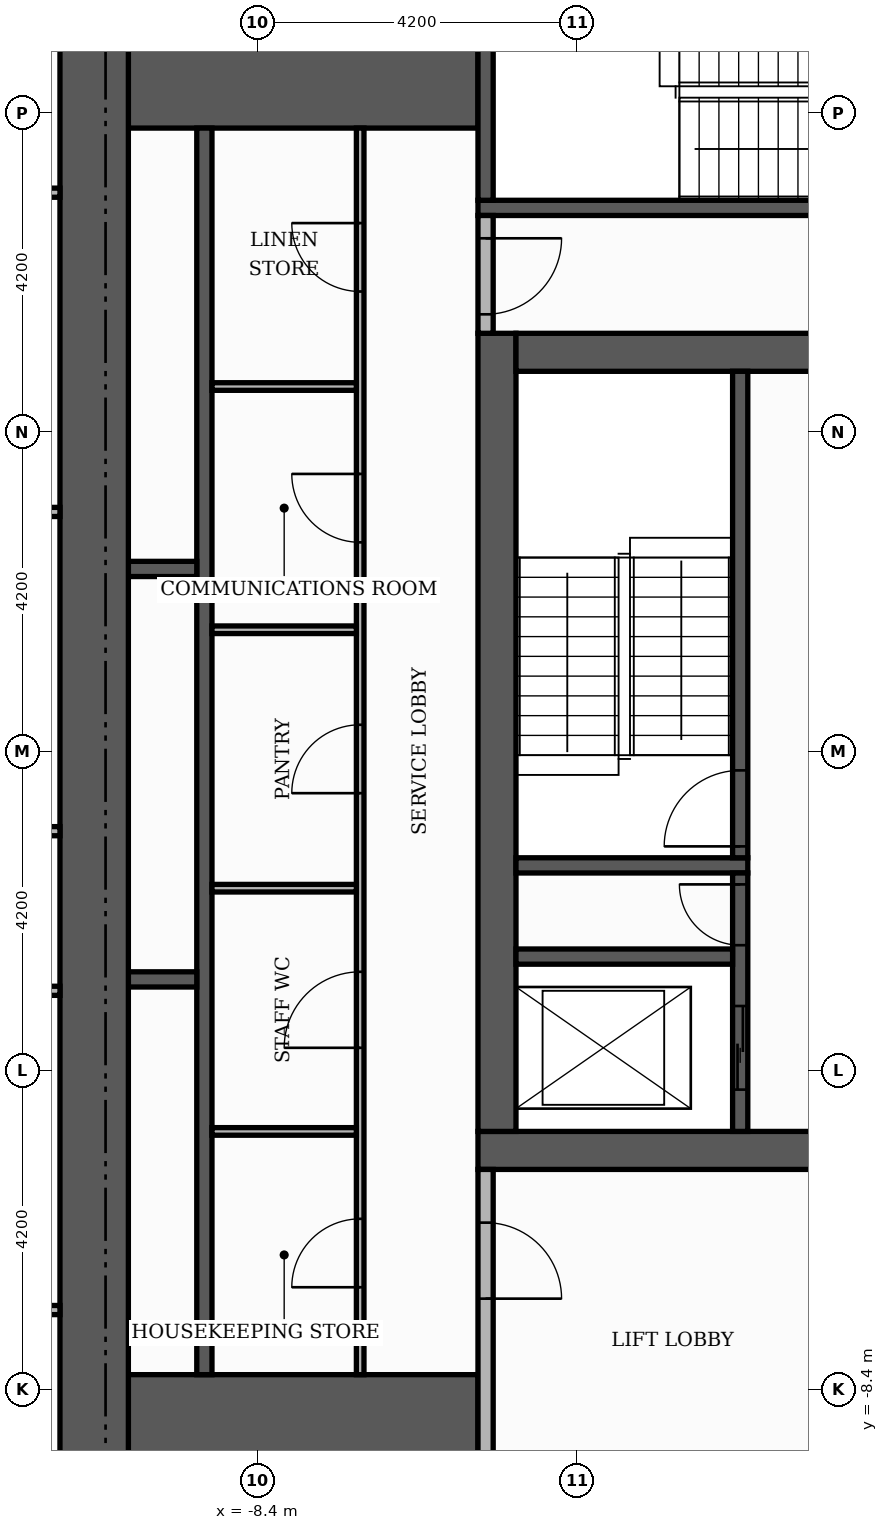
"""IFC4 building model, lengths in metres.
Left out: names, types, materials, properties, quantities, classifications, styles, units other than length and angle.
Written with IfcOpenShell. Run it as: python <this file> out.ifc"""

import sys

from ifc_helpers import new_model, si_unit, direction, frame, frame_2d, origin, place, context, subcontext, project, spatial, rectangle, extrude, element, fill, save


model = new_model("IFC4")
c1 = context("Model", 3, precision=1e-05, world=origin(), true_north=direction((0.0, 1.0)))
c2 = subcontext(c1, "Body", "Model", "MODEL_VIEW")
j1 = project(units=[si_unit("LENGTHUNIT", "METRE"), si_unit("PLANEANGLEUNIT", "RADIAN")], contexts=[c1])
p1 = place(None, origin())
s1 = spatial("IfcSite", under=j1, at=p1, CompositionType="ELEMENT")
p2 = place(p1, origin())
s2 = spatial("IfcBuilding", under=s1, at=p2, CompositionType="ELEMENT")
p3 = place(p2, frame((0.0, 0.0, 168.9)))
s3 = spatial("IfcBuildingStorey", under=s2, at=p3, CompositionType="ELEMENT", Elevation=168.9)
p4 = place(p3, frame((-5.5, -5.25, 0.0), z_axis=(0.0, 0.0, 1.0), x_axis=(1.0, 0.0, 0.0)))
e1 = element("IfcWall", 1, at=p4, inside=s3, PredefinedType="SHEAR", context=c2, shape_type="SweptSolid", body=[
    extrude(rectangle(XDim=11.0, YDim=0.5, at=frame_2d((5.5, 0.0))), origin(), (0.0, 0.0, 1.0), 3.48),
])
p5 = place(p4, frame((4.9, 0.0, 0.0)))
e2 = element("IfcOpeningElement", 2, at=p5, cuts=e1, PredefinedType="OPENING", context=c2, shape_type="SweptSolid", body=[
    extrude(rectangle(XDim=1.2, YDim=2.1, at=frame_2d((0.6, 1.05))), frame((0.0, 0.26, 0.0), z_axis=(0.0, -1.0, 0.0), x_axis=(1.0, 0.0, 0.0)), (0.0, 0.0, 1.0), 0.52),
])
p6 = place(p3, frame((-5.25, -5.0, 0.0), z_axis=(0.0, 0.0, 1.0), x_axis=(0.0, 1.0, 0.0)))
e3 = element("IfcWall", 3, at=p6, inside=s3, PredefinedType="SHEAR", context=c2, shape_type="SweptSolid", body=[
    extrude(rectangle(XDim=10.5, YDim=0.5, at=frame_2d((5.25, 0.0))), origin(), (0.0, 0.0, 1.0), 3.48),
])
p7 = place(p3, frame((-5.0, 5.25, 0.0), z_axis=(0.0, 0.0, 1.0), x_axis=(1.0, 0.0, 0.0)))
e4 = element("IfcWall", 4, at=p7, inside=s3, PredefinedType="SHEAR", context=c2, shape_type="SweptSolid", body=[
    extrude(rectangle(XDim=10.0, YDim=0.5, at=frame_2d((5.0, 0.0))), origin(), (0.0, 0.0, 1.0), 3.48),
])
p8 = place(p7, frame((4.4, 0.0, 0.0)))
e5 = element("IfcOpeningElement", 5, at=p8, cuts=e4, PredefinedType="OPENING", context=c2, shape_type="SweptSolid", body=[
    extrude(rectangle(XDim=1.2, YDim=2.1, at=frame_2d((0.6, 1.05))), frame((0.0, 0.26, 0.0), z_axis=(0.0, -1.0, 0.0), x_axis=(1.0, 0.0, 0.0)), (0.0, 0.0, 1.0), 0.52),
])
for number, where, z_axis, x_axis in (
    (6, (-10.1, -9.15, 0.0), (0.0, 0.0, 1.0), (1.0, 0.0, 0.0)),
    (7, (-10.1, 9.15, 0.0), (0.0, 0.0, 1.0), (1.0, 0.0, 0.0)),
):
    element("IfcWall", number, at=place(p3, frame(where, z_axis=z_axis, x_axis=x_axis)), inside=s3, PredefinedType="SHEAR", context=c2, shape_type="SweptSolid", body=[
        extrude(rectangle(XDim=4.6, YDim=1.9, at=frame_2d((2.3, 0.0))), origin(), (0.0, 0.0, 1.0), 3.48),
    ])
p9 = place(p3, frame((-5.0, -1.5, 0.0), z_axis=(0.0, 0.0, 1.0), x_axis=(1.0, 0.0, 0.0)))
e8 = element("IfcWall", 8, at=p9, inside=s3, PredefinedType="SHEAR", context=c2, shape_type="SweptSolid", body=[
    extrude(rectangle(XDim=3.05, YDim=0.2, at=frame_2d((1.525, 0.0))), origin(), (0.0, 0.0, 1.0), 3.48),
])
p10 = place(p3, frame((-2.05, -1.4, 0.0), z_axis=(0.0, 0.0, 1.0), x_axis=(0.0, 1.0, 0.0)))
e9 = element("IfcWall", 9, at=p10, inside=s3, PredefinedType="SHEAR", context=c2, shape_type="SweptSolid", body=[
    extrude(rectangle(XDim=6.4, YDim=0.2, at=frame_2d((3.2, 0.0))), origin(), (0.0, 0.0, 1.0), 3.48),
])
p11 = place(p10, frame((0.15, 0.0, 0.0)))
e10 = element("IfcOpeningElement", 10, at=p11, cuts=e9, PredefinedType="OPENING", context=c2, shape_type="SweptSolid", body=[
    extrude(rectangle(XDim=1.0, YDim=2.1, at=frame_2d((0.5, 1.05))), frame((0.0, 0.11, 0.0), z_axis=(0.0, -1.0, 0.0), x_axis=(1.0, 0.0, 0.0)), (0.0, 0.0, 1.0), 0.22),
])
p12 = place(p3, frame((-5.5, 7.15, 0.0), z_axis=(0.0, 0.0, 1.0), x_axis=(1.0, 0.0, 0.0)))
e11 = element("IfcWall", 11, at=p12, inside=s3, PredefinedType="SHEAR", context=c2, shape_type="SweptSolid", body=[
    extrude(rectangle(XDim=6.8, YDim=0.2, at=frame_2d((3.4, 0.0))), origin(), (0.0, 0.0, 1.0), 3.48),
])
p13 = place(p3, frame((-5.4, 7.25, 0.0), z_axis=(0.0, 0.0, 1.0), x_axis=(0.0, 1.0, 0.0)))
e12 = element("IfcWall", 12, at=p13, inside=s3, PredefinedType="SHEAR", context=c2, shape_type="SweptSolid", body=[
    extrude(rectangle(XDim=2.85, YDim=0.2, at=frame_2d((1.425, 0.0))), origin(), (0.0, 0.0, 1.0), 3.48),
])
p14 = place(p3, frame((-9.1, -8.2, 0.0), z_axis=(0.0, 0.0, 1.0), x_axis=(0.0, 1.0, 0.0)))
e13 = element("IfcWall", 13, at=p14, inside=s3, PredefinedType="SHEAR", context=c2, shape_type="SweptSolid", body=[
    extrude(rectangle(XDim=16.4, YDim=0.2, at=frame_2d((8.2, 0.0))), origin(), (0.0, 0.0, 1.0), 3.48),
])
p15 = place(p3, frame((-2.05, -5.0, 0.0), z_axis=(0.0, 0.0, 1.0), x_axis=(0.0, 1.0, 0.0)))
e14 = element("IfcWall", 14, at=p15, inside=s3, PredefinedType="SHEAR", context=c2, shape_type="SweptSolid", body=[
    extrude(rectangle(XDim=3.4, YDim=0.2, at=frame_2d((1.7, 0.0))), origin(), (0.0, 0.0, 1.0), 3.48),
])
p16 = place(p15, frame((0.55, 0.0, 0.0)))
e15 = element("IfcOpeningElement", 15, at=p16, cuts=e14, PredefinedType="OPENING", context=c2, shape_type="SweptSolid", body=[
    extrude(rectangle(XDim=1.1, YDim=2.1, at=frame_2d((0.55, 1.05))), frame((0.0, 0.11, 0.0), z_axis=(0.0, -1.0, 0.0), x_axis=(1.0, 0.0, 0.0)), (0.0, 0.0, 1.0), 0.22),
])
p17 = place(p15, frame((2.45, 0.0, 0.0)))
e16 = element("IfcOpeningElement", 16, at=p17, cuts=e14, PredefinedType="OPENING", context=c2, shape_type="SweptSolid", body=[
    extrude(rectangle(XDim=0.8, YDim=2.1, at=frame_2d((0.4, 1.05))), frame((0.0, 0.11, 0.0), z_axis=(0.0, -1.0, 0.0), x_axis=(1.0, 0.0, 0.0)), (0.0, 0.0, 1.0), 0.22),
])
p18 = place(p3, frame((-10.1, -3.0, 0.0), z_axis=(0.0, 0.0, 1.0), x_axis=(1.0, 0.0, 0.0)))
e17 = element("IfcWall", 17, at=p18, inside=s3, PredefinedType="SHEAR", context=c2, shape_type="SweptSolid", body=[
    extrude(rectangle(XDim=0.9, YDim=0.2, at=frame_2d((0.45, 0.0))), origin(), (0.0, 0.0, 1.0), 3.48),
])
p19 = place(p3, frame((-5.0, -2.7, 0.0), z_axis=(0.0, 0.0, 1.0), x_axis=(1.0, 0.0, 0.0)))
e18 = element("IfcWall", 18, at=p19, inside=s3, PredefinedType="SHEAR", context=c2, shape_type="SweptSolid", body=[
    extrude(rectangle(XDim=2.85, YDim=0.2, at=frame_2d((1.425, 0.0))), origin(), (0.0, 0.0, 1.0), 3.48),
])
p20 = place(p3, frame((-10.1, 2.4, 0.0), z_axis=(0.0, 0.0, 1.0), x_axis=(1.0, 0.0, 0.0)))
e19 = element("IfcWall", 19, at=p20, inside=s3, PredefinedType="SHEAR", context=c2, shape_type="SweptSolid", body=[
    extrude(rectangle(XDim=0.9, YDim=0.2, at=frame_2d((0.45, 0.0))), origin(), (0.0, 0.0, 1.0), 3.48),
])
p21 = place(p3, frame((-10.55, -10.1, 0.0), z_axis=(0.0, 0.0, 1.0), x_axis=(0.0, 1.0, 0.0)))
e20 = element("IfcWall", 20, at=p21, inside=s3, PredefinedType="SHEAR", context=c2, shape_type="SweptSolid", body=[
    extrude(rectangle(XDim=20.2, YDim=0.9, at=frame_2d((10.1, 0.0))), origin(), (0.0, 0.0, 1.0), 3.48),
])
p22 = place(p3, frame((-5.4, -10.1, 0.0), z_axis=(0.0, 0.0, 1.0), x_axis=(0.0, 1.0, 0.0)))
e21 = element("IfcWall", 21, at=p22, inside=s3, PredefinedType="PARTITIONING", context=c2, shape_type="SweptSolid", body=[
    extrude(rectangle(XDim=4.6, YDim=0.2, at=frame_2d((2.3, 0.0))), origin(), (0.0, 0.0, 1.0), 3.48),
])
p23 = place(p22, frame((2.9, 0.0, 0.0)))
e22 = element("IfcOpeningElement", 22, at=p23, cuts=e21, PredefinedType="OPENING", context=c2, shape_type="SweptSolid", body=[
    extrude(rectangle(XDim=1.0, YDim=2.1, at=frame_2d((0.5, 1.05))), frame((0.0, 0.11, 0.0), z_axis=(0.0, -1.0, 0.0), x_axis=(1.0, 0.0, 0.0)), (0.0, 0.0, 1.0), 0.22),
])
p24 = place(p3, frame((-7.05, -8.2, 0.0), z_axis=(0.0, 0.0, 1.0), x_axis=(0.0, 1.0, 0.0)))
e23 = element("IfcWall", 23, at=p24, inside=s3, PredefinedType="PARTITIONING", context=c2, shape_type="SweptSolid", body=[
    extrude(rectangle(XDim=16.4, YDim=0.1, at=frame_2d((8.2, 0.0))), origin(), (0.0, 0.0, 1.0), 3.48),
])
p25 = place(p24, frame((1.15, 0.0, 0.0)))
e24 = element("IfcOpeningElement", 24, at=p25, cuts=e23, PredefinedType="OPENING", context=c2, shape_type="SweptSolid", body=[
    extrude(rectangle(XDim=0.9, YDim=2.1, at=frame_2d((0.45, 1.05))), frame((0.0, 0.06, 0.0), z_axis=(0.0, -1.0, 0.0), x_axis=(1.0, 0.0, 0.0)), (0.0, 0.0, 1.0), 0.12),
])
p26 = place(p24, frame((4.3, 0.0, 0.0)))
e25 = element("IfcOpeningElement", 25, at=p26, cuts=e23, PredefinedType="OPENING", context=c2, shape_type="SweptSolid", body=[
    extrude(rectangle(XDim=1.0, YDim=2.1, at=frame_2d((0.5, 1.05))), frame((0.0, 0.06, 0.0), z_axis=(0.0, -1.0, 0.0), x_axis=(1.0, 0.0, 0.0)), (0.0, 0.0, 1.0), 0.12),
])
p27 = place(p24, frame((7.65, 0.0, 0.0)))
e26 = element("IfcOpeningElement", 26, at=p27, cuts=e23, PredefinedType="OPENING", context=c2, shape_type="SweptSolid", body=[
    extrude(rectangle(XDim=0.9, YDim=2.1, at=frame_2d((0.45, 1.05))), frame((0.0, 0.06, 0.0), z_axis=(0.0, -1.0, 0.0), x_axis=(1.0, 0.0, 0.0)), (0.0, 0.0, 1.0), 0.12),
])
p28 = place(p24, frame((10.95, 0.0, 0.0)))
e27 = element("IfcOpeningElement", 27, at=p28, cuts=e23, PredefinedType="OPENING", context=c2, shape_type="SweptSolid", body=[
    extrude(rectangle(XDim=0.9, YDim=2.1, at=frame_2d((0.45, 1.05))), frame((0.0, 0.06, 0.0), z_axis=(0.0, -1.0, 0.0), x_axis=(1.0, 0.0, 0.0)), (0.0, 0.0, 1.0), 0.12),
])
p29 = place(p24, frame((14.25, 0.0, 0.0)))
e28 = element("IfcOpeningElement", 28, at=p29, cuts=e23, PredefinedType="OPENING", context=c2, shape_type="SweptSolid", body=[
    extrude(rectangle(XDim=0.9, YDim=2.1, at=frame_2d((0.45, 1.05))), frame((0.0, 0.06, 0.0), z_axis=(0.0, -1.0, 0.0), x_axis=(1.0, 0.0, 0.0)), (0.0, 0.0, 1.0), 0.12),
])
for number, where, z_axis, x_axis in (
    (29, (-9.0, -5.0, 0.0), (0.0, 0.0, 1.0), (1.0, 0.0, 0.0)),
    (30, (-9.0, -1.8, 0.0), (0.0, 0.0, 1.0), (1.0, 0.0, 0.0)),
    (31, (-9.0, 1.6, 0.0), (0.0, 0.0, 1.0), (1.0, 0.0, 0.0)),
    (32, (-9.0, 4.8, 0.0), (0.0, 0.0, 1.0), (1.0, 0.0, 0.0)),
):
    element("IfcWall", number, at=place(p3, frame(where, z_axis=z_axis, x_axis=x_axis)), inside=s3, PredefinedType="PARTITIONING", context=c2, shape_type="SweptSolid", body=[
        extrude(rectangle(XDim=1.9, YDim=0.1, at=frame_2d((0.95, 0.0))), origin(), (0.0, 0.0, 1.0), 3.48),
    ])
p30 = place(p3, frame((-5.4, 5.5, 0.0), z_axis=(0.0, 0.0, 1.0), x_axis=(0.0, 1.0, 0.0)))
e33 = element("IfcWall", 33, at=p30, inside=s3, PredefinedType="PARTITIONING", context=c2, shape_type="SweptSolid", body=[
    extrude(rectangle(XDim=1.55, YDim=0.2, at=frame_2d((0.775, 0.0))), origin(), (0.0, 0.0, 1.0), 3.48),
])
p31 = place(p30, frame((0.25, 0.0, 0.0)))
e34 = element("IfcOpeningElement", 34, at=p31, cuts=e33, PredefinedType="OPENING", context=c2, shape_type="SweptSolid", body=[
    extrude(rectangle(XDim=1.0, YDim=2.1, at=frame_2d((0.5, 1.05))), frame((0.0, 0.11, 0.0), z_axis=(0.0, -1.0, 0.0), x_axis=(1.0, 0.0, 0.0)), (0.0, 0.0, 1.0), 0.22),
])
for number, where, z_axis, x_axis in (
    (35, (-19.22, -7.35, 0.0), (0.0, 0.0, 1.0), (1.0, 0.0, 0.0)),
    (36, (-19.22, -3.15, 0.0), (0.0, 0.0, 1.0), (1.0, 0.0, 0.0)),
    (37, (-19.22, -1.05, 0.0), (0.0, 0.0, 1.0), (1.0, 0.0, 0.0)),
    (38, (-19.22, 3.15, 0.0), (0.0, 0.0, 1.0), (1.0, 0.0, 0.0)),
):
    element("IfcWall", number, at=place(p3, frame(where, z_axis=z_axis, x_axis=x_axis)), inside=s3, PredefinedType="PARTITIONING", context=c2, shape_type="SweptSolid", body=[
        extrude(rectangle(XDim=8.22, YDim=0.12, at=frame_2d((4.11, 0.0))), origin(), (0.0, 0.0, 1.0), 3.48),
    ])
p32 = place(p3, frame((-19.22, 7.35, 0.0), z_axis=(0.0, 0.0, 1.0), x_axis=(1.0, 0.0, 0.0)))
e39 = element("IfcWall", 39, at=p32, inside=s3, PredefinedType="PARTITIONING", context=c2, shape_type="SweptSolid", body=[
    extrude(rectangle(XDim=8.22, YDim=0.12, at=frame_2d((4.11, 0.0))), origin(), (0.0, 0.0, 1.0), 3.48),
])
p33 = place(p32, frame((3.66, 0.0, 0.0)))
e40 = element("IfcOpeningElement", 40, at=p33, cuts=e39, PredefinedType="OPENING", context=c2, shape_type="SweptSolid", body=[
    extrude(rectangle(XDim=0.9, YDim=2.1, at=frame_2d((0.45, 1.05))), frame((0.0, 0.07, 0.0), z_axis=(0.0, -1.0, 0.0), x_axis=(1.0, 0.0, 0.0)), (0.0, 0.0, 1.0), 0.14),
])
p34 = place(p16, origin())
e41 = element("IfcDoor", 41, at=p34, inside=s3, OperationType="SLIDING_TO_LEFT", PredefinedType="DOOR", context=c2, shape_type="SweptSolid", body=[
    extrude(rectangle(XDim=1.1, YDim=2.1, at=frame_2d((0.55, 1.05))), frame((0.0, 0.025, 0.0), z_axis=(0.0, -1.0, 0.0), x_axis=(1.0, 0.0, 0.0)), (0.0, 0.0, 1.0), 0.05),
])
fill(e15, e41)
p35 = place(p11, origin())
e42 = element("IfcDoor", 42, at=p35, inside=s3, OperationType="SINGLE_SWING_LEFT", PredefinedType="DOOR", context=c2, shape_type="SweptSolid", body=[
    extrude(rectangle(XDim=1.0, YDim=2.1, at=frame_2d((0.5, 1.05))), frame((0.0, 0.025, 0.0), z_axis=(0.0, -1.0, 0.0), x_axis=(1.0, 0.0, 0.0)), (0.0, 0.0, 1.0), 0.05),
])
fill(e10, e42)
p36 = place(p17, origin())
e43 = element("IfcDoor", 43, at=p36, inside=s3, OperationType="SINGLE_SWING_RIGHT", PredefinedType="DOOR", context=c2, shape_type="SweptSolid", body=[
    extrude(rectangle(XDim=0.8, YDim=2.1, at=frame_2d((0.4, 1.05))), frame((0.0, 0.025, 0.0), z_axis=(0.0, -1.0, 0.0), x_axis=(1.0, 0.0, 0.0)), (0.0, 0.0, 1.0), 0.05),
])
fill(e16, e43)
p37 = place(p31, frame((1.0, 0.0, 0.0), z_axis=(0.0, 0.0, 1.0), x_axis=(-1.0, 0.0, 0.0)))
e44 = element("IfcDoor", 44, at=p37, inside=s3, OperationType="SINGLE_SWING_RIGHT", PredefinedType="DOOR", context=c2, shape_type="SweptSolid", body=[
    extrude(rectangle(XDim=1.0, YDim=2.1, at=frame_2d((0.5, 1.05))), frame((0.0, 0.025, 0.0), z_axis=(0.0, -1.0, 0.0), x_axis=(1.0, 0.0, 0.0)), (0.0, 0.0, 1.0), 0.05),
])
fill(e34, e44)
p38 = place(p23, frame((1.0, 0.0, 0.0), z_axis=(0.0, 0.0, 1.0), x_axis=(-1.0, 0.0, 0.0)))
e45 = element("IfcDoor", 45, at=p38, inside=s3, OperationType="SINGLE_SWING_LEFT", PredefinedType="DOOR", context=c2, shape_type="SweptSolid", body=[
    extrude(rectangle(XDim=1.0, YDim=2.1, at=frame_2d((0.5, 1.05))), frame((0.0, 0.025, 0.0), z_axis=(0.0, -1.0, 0.0), x_axis=(1.0, 0.0, 0.0)), (0.0, 0.0, 1.0), 0.05),
])
fill(e22, e45)
p39 = place(p25, origin())
e46 = element("IfcDoor", 46, at=p39, inside=s3, OperationType="SINGLE_SWING_LEFT", PredefinedType="DOOR", context=c2, shape_type="SweptSolid", body=[
    extrude(rectangle(XDim=0.9, YDim=2.1, at=frame_2d((0.45, 1.05))), frame((0.0, 0.025, 0.0), z_axis=(0.0, -1.0, 0.0), x_axis=(1.0, 0.0, 0.0)), (0.0, 0.0, 1.0), 0.05),
])
fill(e24, e46)
p40 = place(p26, origin())
e47 = element("IfcDoor", 47, at=p40, inside=s3, OperationType="SINGLE_SWING_LEFT", PredefinedType="DOOR", context=c2, shape_type="SweptSolid", body=[
    extrude(rectangle(XDim=1.0, YDim=2.1, at=frame_2d((0.5, 1.05))), frame((0.0, 0.025, 0.0), z_axis=(0.0, -1.0, 0.0), x_axis=(1.0, 0.0, 0.0)), (0.0, 0.0, 1.0), 0.05),
])
fill(e25, e47)
p41 = place(p27, origin())
e48 = element("IfcDoor", 48, at=p41, inside=s3, OperationType="SINGLE_SWING_LEFT", PredefinedType="DOOR", context=c2, shape_type="SweptSolid", body=[
    extrude(rectangle(XDim=0.9, YDim=2.1, at=frame_2d((0.45, 1.05))), frame((0.0, 0.025, 0.0), z_axis=(0.0, -1.0, 0.0), x_axis=(1.0, 0.0, 0.0)), (0.0, 0.0, 1.0), 0.05),
])
fill(e26, e48)
p42 = place(p28, origin())
e49 = element("IfcDoor", 49, at=p42, inside=s3, OperationType="SINGLE_SWING_RIGHT", PredefinedType="DOOR", context=c2, shape_type="SweptSolid", body=[
    extrude(rectangle(XDim=0.9, YDim=2.1, at=frame_2d((0.45, 1.05))), frame((0.0, 0.025, 0.0), z_axis=(0.0, -1.0, 0.0), x_axis=(1.0, 0.0, 0.0)), (0.0, 0.0, 1.0), 0.05),
])
fill(e27, e49)
p43 = place(p29, origin())
e50 = element("IfcDoor", 50, at=p43, inside=s3, OperationType="SINGLE_SWING_RIGHT", PredefinedType="DOOR", context=c2, shape_type="SweptSolid", body=[
    extrude(rectangle(XDim=0.9, YDim=2.1, at=frame_2d((0.45, 1.05))), frame((0.0, 0.025, 0.0), z_axis=(0.0, -1.0, 0.0), x_axis=(1.0, 0.0, 0.0)), (0.0, 0.0, 1.0), 0.05),
])
fill(e28, e50)
save(model, sys.argv[1])
